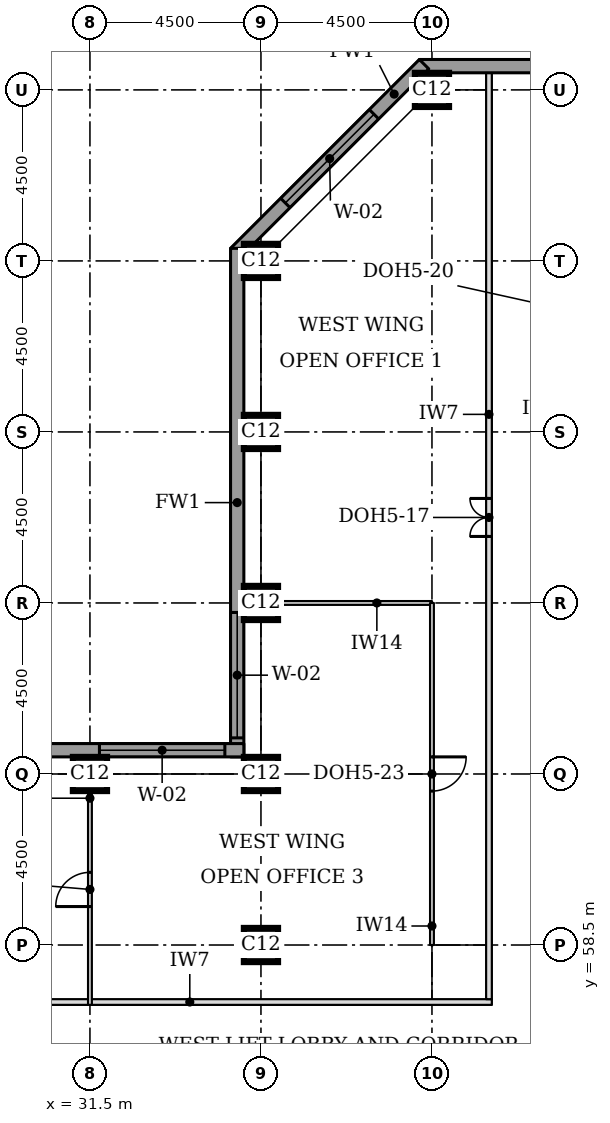
"""IFC4 building model, lengths in metres.
Left out: names, types, materials, properties, quantities, classifications, styles, units other than length and angle.
Written with IfcOpenShell. Run it as: python <this file> out.ifc"""

import sys

from ifc_helpers import new_model, si_unit, direction, frame, frame_2d, origin, origin_2d, place, context, subcontext, project, spatial, rectangle, extrude, element, fill, save


model = new_model("IFC4")
c1 = context("Model", 3, precision=1e-05, world=origin(), true_north=direction((0.0, 1.0)))
c2 = subcontext(c1, "Body", "Model", "MODEL_VIEW")
j1 = project(units=[si_unit("LENGTHUNIT", "METRE"), si_unit("PLANEANGLEUNIT", "RADIAN")], contexts=[c1])
p1 = place(None, origin())
s1 = spatial("IfcSite", under=j1, at=p1, CompositionType="ELEMENT")
p2 = place(p1, origin())
s2 = spatial("IfcBuilding", under=s1, at=p2, CompositionType="ELEMENT")
p3 = place(p2, frame((0.0, 0.0, 177.3)))
s3 = spatial("IfcBuildingStorey", under=s2, at=p3, CompositionType="ELEMENT", Elevation=177.3)
for number, where, z_axis, x_axis in (
    (1, (36.0, 58.5, 0.0), (0.0, 0.0, 1.0), (1.0, 0.0, 0.0)),
    (2, (31.5, 63.0, 0.0), (0.0, 0.0, 1.0), (1.0, 0.0, 0.0)),
    (3, (36.0, 63.0, 0.0), (0.0, 0.0, 1.0), (1.0, 0.0, 0.0)),
    (4, (36.0, 67.5, 0.0), (0.0, 0.0, 1.0), (1.0, 0.0, 0.0)),
    (5, (36.0, 72.0, 0.0), (0.0, 0.0, 1.0), (1.0, 0.0, 0.0)),
    (6, (36.0, 76.5, 0.0), (0.0, 0.0, 1.0), (1.0, 0.0, 0.0)),
    (7, (40.5, 81.0, 0.0), (0.0, 0.0, 1.0), (1.0, 0.0, 0.0)),
):
    element("IfcColumn", number, at=place(p3, frame(where, z_axis=z_axis, x_axis=x_axis)), inside=s3, PredefinedType="COLUMN", context=c2, shape_type="SweptSolid", body=[
        extrude(rectangle(XDim=0.9, YDim=0.9, at=origin_2d()), origin(), (0.0, 0.0, 1.0), 3.7),
    ])
p4 = place(p3, frame((72.331, 81.625, 0.0), z_axis=(0.0, 0.0, 1.0), x_axis=(-1.0, 0.0, 0.0)))
e8 = element("IfcWall", 8, at=p4, inside=s3, PredefinedType="STANDARD", context=c2, shape_type="SweptSolid", body=[
    extrude(rectangle(XDim=32.163, YDim=0.35, at=frame_2d((16.081, 0.0))), origin(), (0.0, 0.0, 1.0), 3.525),
])
p5 = place(p4, frame((5.431, 0.0, 0.9)))
e9 = element("IfcOpeningElement", 9, at=p5, cuts=e8, PredefinedType="OPENING", context=c2, shape_type="SweptSolid", body=[
    extrude(rectangle(XDim=3.3, YDim=1.9, at=frame_2d((1.65, 0.95))), frame((0.0, 0.185, 0.0), z_axis=(0.0, -1.0, 0.0), x_axis=(1.0, 0.0, 0.0)), (0.0, 0.0, 1.0), 0.37),
])
p6 = place(p4, frame((9.931, 0.0, 0.9)))
e10 = element("IfcOpeningElement", 10, at=p6, cuts=e8, PredefinedType="OPENING", context=c2, shape_type="SweptSolid", body=[
    extrude(rectangle(XDim=3.3, YDim=1.9, at=frame_2d((1.65, 0.95))), frame((0.0, 0.185, 0.0), z_axis=(0.0, -1.0, 0.0), x_axis=(1.0, 0.0, 0.0)), (0.0, 0.0, 1.0), 0.37),
])
p7 = place(p4, frame((14.431, 0.0, 0.9)))
e11 = element("IfcOpeningElement", 11, at=p7, cuts=e8, PredefinedType="OPENING", context=c2, shape_type="SweptSolid", body=[
    extrude(rectangle(XDim=3.3, YDim=1.9, at=frame_2d((1.65, 0.95))), frame((0.0, 0.185, 0.0), z_axis=(0.0, -1.0, 0.0), x_axis=(1.0, 0.0, 0.0)), (0.0, 0.0, 1.0), 0.37),
])
p8 = place(p4, frame((18.931, 0.0, 0.9)))
e12 = element("IfcOpeningElement", 12, at=p8, cuts=e8, PredefinedType="OPENING", context=c2, shape_type="SweptSolid", body=[
    extrude(rectangle(XDim=3.3, YDim=1.9, at=frame_2d((1.65, 0.95))), frame((0.0, 0.185, 0.0), z_axis=(0.0, -1.0, 0.0), x_axis=(1.0, 0.0, 0.0)), (0.0, 0.0, 1.0), 0.37),
])
p9 = place(p4, frame((23.431, 0.0, 0.9)))
e13 = element("IfcOpeningElement", 13, at=p9, cuts=e8, PredefinedType="OPENING", context=c2, shape_type="SweptSolid", body=[
    extrude(rectangle(XDim=3.3, YDim=1.9, at=frame_2d((1.65, 0.95))), frame((0.0, 0.185, 0.0), z_axis=(0.0, -1.0, 0.0), x_axis=(1.0, 0.0, 0.0)), (0.0, 0.0, 1.0), 0.37),
])
p10 = place(p3, frame((40.292, 81.676, 0.0), z_axis=(0.0, 0.0, 1.0), x_axis=(-0.707106781187, -0.707106781187, 0.0)))
e14 = element("IfcWall", 14, at=p10, inside=s3, PredefinedType="STANDARD", context=c2, shape_type="SweptSolid", body=[
    extrude(rectangle(XDim=7.027, YDim=0.35, at=frame_2d((3.513, 0.0))), origin(), (0.0, 0.0, 1.0), 3.525),
])
p11 = place(p10, frame((1.863, 0.0, 0.9)))
e15 = element("IfcOpeningElement", 15, at=p11, cuts=e14, PredefinedType="OPENING", context=c2, shape_type="SweptSolid", body=[
    extrude(rectangle(XDim=3.3, YDim=1.9, at=frame_2d((1.65, 0.95))), frame((0.0, 0.185, 0.0), z_axis=(0.0, -1.0, 0.0), x_axis=(1.0, 0.0, 0.0)), (0.0, 0.0, 1.0), 0.37),
])
p12 = place(p3, frame((35.375, 76.831, 0.0), z_axis=(0.0, 0.0, 1.0), x_axis=(0.0, -1.0, 0.0)))
e16 = element("IfcWall", 16, at=p12, inside=s3, PredefinedType="STANDARD", context=c2, shape_type="SweptSolid", body=[
    extrude(rectangle(XDim=13.381, YDim=0.35, at=frame_2d((6.691, 0.0))), origin(), (0.0, 0.0, 1.0), 3.525),
])
p13 = place(p12, frame((9.581, 0.0, 0.9)))
e17 = element("IfcOpeningElement", 17, at=p13, cuts=e16, PredefinedType="OPENING", context=c2, shape_type="SweptSolid", body=[
    extrude(rectangle(XDim=3.3, YDim=1.9, at=frame_2d((1.65, 0.95))), frame((0.0, 0.185, 0.0), z_axis=(0.0, -1.0, 0.0), x_axis=(1.0, 0.0, 0.0)), (0.0, 0.0, 1.0), 0.37),
])
p14 = place(p3, frame((35.55, 63.625, 0.0), z_axis=(0.0, 0.0, 1.0), x_axis=(-1.0, 0.0, 0.0)))
e18 = element("IfcWall", 18, at=p14, inside=s3, PredefinedType="STANDARD", context=c2, shape_type="SweptSolid", body=[
    extrude(rectangle(XDim=17.881, YDim=0.35, at=frame_2d((8.941, 0.0))), origin(), (0.0, 0.0, 1.0), 3.525),
])
p15 = place(p14, frame((0.5, 0.0, 0.9)))
e19 = element("IfcOpeningElement", 19, at=p15, cuts=e18, PredefinedType="OPENING", context=c2, shape_type="SweptSolid", body=[
    extrude(rectangle(XDim=3.3, YDim=1.9, at=frame_2d((1.65, 0.95))), frame((0.0, 0.185, 0.0), z_axis=(0.0, -1.0, 0.0), x_axis=(1.0, 0.0, 0.0)), (0.0, 0.0, 1.0), 0.37),
])
p16 = place(p14, frame((9.15, 0.0, 0.9)))
e20 = element("IfcOpeningElement", 20, at=p16, cuts=e18, PredefinedType="OPENING", context=c2, shape_type="SweptSolid", body=[
    extrude(rectangle(XDim=3.3, YDim=1.9, at=frame_2d((1.65, 0.95))), frame((0.0, 0.185, 0.0), z_axis=(0.0, -1.0, 0.0), x_axis=(1.0, 0.0, 0.0)), (0.0, 0.0, 1.0), 0.37),
])
p17 = place(p3, frame((29.38, 57.0, 0.0), z_axis=(0.0, 0.0, 1.0), x_axis=(1.0, 0.0, 0.0)))
e21 = element("IfcWall", 21, at=p17, inside=s3, PredefinedType="PARTITIONING", context=c2, shape_type="SweptSolid", body=[
    extrude(rectangle(XDim=12.695, YDim=0.15, at=frame_2d((6.348, 0.0))), origin(), (0.0, 0.0, 1.0), 3.55),
])
p18 = place(p3, frame((42.0, 57.075, 0.0), z_axis=(0.0, 0.0, 1.0), x_axis=(0.0, 1.0, 0.0)))
e22 = element("IfcWall", 22, at=p18, inside=s3, PredefinedType="PARTITIONING", context=c2, shape_type="SweptSolid", body=[
    extrude(rectangle(XDim=24.375, YDim=0.15, at=frame_2d((12.188, 0.0))), origin(), (0.0, 0.0, 1.0), 3.55),
])
p19 = place(p18, frame((12.175, 0.0, 0.0)))
e23 = element("IfcOpeningElement", 23, at=p19, cuts=e22, PredefinedType="OPENING", context=c2, shape_type="SweptSolid", body=[
    extrude(rectangle(XDim=1.0, YDim=2.1, at=frame_2d((0.5, 1.05))), frame((0.0, 0.085, 0.0), z_axis=(0.0, -1.0, 0.0), x_axis=(1.0, 0.0, 0.0)), (0.0, 0.0, 1.0), 0.17),
])
p20 = place(p3, frame((36.0, 67.5, 0.0), z_axis=(0.0, 0.0, 1.0), x_axis=(1.0, 0.0, 0.0)))
e24 = element("IfcWall", 24, at=p20, inside=s3, PredefinedType="PARTITIONING", context=c2, shape_type="SweptSolid", body=[
    extrude(rectangle(XDim=4.5, YDim=0.1, at=frame_2d((2.25, 0.0))), origin(), (0.0, 0.0, 1.0), 3.55),
])
p21 = place(p3, frame((40.5, 67.5, 0.0), z_axis=(0.0, 0.0, 1.0), x_axis=(0.0, -1.0, 0.0)))
e25 = element("IfcWall", 25, at=p21, inside=s3, PredefinedType="PARTITIONING", context=c2, shape_type="SweptSolid", body=[
    extrude(rectangle(XDim=9.0, YDim=0.1, at=frame_2d((4.5, 0.0))), origin(), (0.0, 0.0, 1.0), 3.55),
])
p22 = place(p21, frame((4.05, 0.0, 0.0)))
e26 = element("IfcOpeningElement", 26, at=p22, cuts=e25, PredefinedType="OPENING", context=c2, shape_type="SweptSolid", body=[
    extrude(rectangle(XDim=0.9, YDim=2.1, at=frame_2d((0.45, 1.05))), frame((0.0, 0.06, 0.0), z_axis=(0.0, -1.0, 0.0), x_axis=(1.0, 0.0, 0.0)), (0.0, 0.0, 1.0), 0.12),
])
p23 = place(p3, frame((31.5, 63.0, 0.0), z_axis=(0.0, 0.0, 1.0), x_axis=(0.0, -1.0, 0.0)))
e27 = element("IfcWall", 27, at=p23, inside=s3, PredefinedType="PARTITIONING", context=c2, shape_type="SweptSolid", body=[
    extrude(rectangle(XDim=6.075, YDim=0.1, at=frame_2d((3.038, 0.0))), origin(), (0.0, 0.0, 1.0), 3.55),
])
p24 = place(p23, frame((2.588, 0.0, 0.0)))
e28 = element("IfcOpeningElement", 28, at=p24, cuts=e27, PredefinedType="OPENING", context=c2, shape_type="SweptSolid", body=[
    extrude(rectangle(XDim=0.9, YDim=2.1, at=frame_2d((0.45, 1.05))), frame((0.0, 0.06, 0.0), z_axis=(0.0, -1.0, 0.0), x_axis=(1.0, 0.0, 0.0)), (0.0, 0.0, 1.0), 0.12),
])
p25 = place(p11, origin())
e29 = element("IfcWindow", 29, at=p25, inside=s3, PartitioningType="SINGLE_PANEL", PredefinedType="WINDOW", context=c2, shape_type="SweptSolid", body=[
    extrude(rectangle(XDim=3.3, YDim=1.9, at=frame_2d((1.65, 0.95))), frame((0.0, 0.085, 0.0), z_axis=(0.0, -1.0, 0.0), x_axis=(1.0, 0.0, 0.0)), (0.0, 0.0, 1.0), 0.06),
])
fill(e15, e29)
p26 = place(p13, origin())
e30 = element("IfcWindow", 30, at=p26, inside=s3, PartitioningType="SINGLE_PANEL", PredefinedType="WINDOW", context=c2, shape_type="SweptSolid", body=[
    extrude(rectangle(XDim=3.3, YDim=1.9, at=frame_2d((1.65, 0.95))), frame((0.0, 0.085, 0.0), z_axis=(0.0, -1.0, 0.0), x_axis=(1.0, 0.0, 0.0)), (0.0, 0.0, 1.0), 0.06),
])
fill(e17, e30)
p27 = place(p15, origin())
e31 = element("IfcWindow", 31, at=p27, inside=s3, PartitioningType="SINGLE_PANEL", PredefinedType="WINDOW", context=c2, shape_type="SweptSolid", body=[
    extrude(rectangle(XDim=3.3, YDim=1.9, at=frame_2d((1.65, 0.95))), frame((0.0, 0.085, 0.0), z_axis=(0.0, -1.0, 0.0), x_axis=(1.0, 0.0, 0.0)), (0.0, 0.0, 1.0), 0.06),
])
fill(e19, e31)
p28 = place(p19, origin())
e32 = element("IfcDoor", 32, at=p28, inside=s3, OperationType="DOUBLE_DOOR_SINGLE_SWING", PredefinedType="DOOR", context=c2, shape_type="SweptSolid", body=[
    extrude(rectangle(XDim=1.0, YDim=2.1, at=frame_2d((0.5, 1.05))), frame((0.0, 0.025, 0.0), z_axis=(0.0, -1.0, 0.0), x_axis=(1.0, 0.0, 0.0)), (0.0, 0.0, 1.0), 0.05),
])
fill(e23, e32)
p29 = place(p22, origin())
e33 = element("IfcDoor", 33, at=p29, inside=s3, OperationType="SINGLE_SWING_LEFT", PredefinedType="DOOR", context=c2, shape_type="SweptSolid", body=[
    extrude(rectangle(XDim=0.9, YDim=2.1, at=frame_2d((0.45, 1.05))), frame((0.0, 0.025, 0.0), z_axis=(0.0, -1.0, 0.0), x_axis=(1.0, 0.0, 0.0)), (0.0, 0.0, 1.0), 0.05),
])
fill(e26, e33)
p30 = place(p24, frame((0.9, 0.0, 0.0), z_axis=(0.0, 0.0, 1.0), x_axis=(-1.0, 0.0, 0.0)))
e34 = element("IfcDoor", 34, at=p30, inside=s3, OperationType="SINGLE_SWING_LEFT", PredefinedType="DOOR", context=c2, shape_type="SweptSolid", body=[
    extrude(rectangle(XDim=0.9, YDim=2.1, at=frame_2d((0.45, 1.05))), frame((0.0, 0.025, 0.0), z_axis=(0.0, -1.0, 0.0), x_axis=(1.0, 0.0, 0.0)), (0.0, 0.0, 1.0), 0.05),
])
fill(e28, e34)
save(model, sys.argv[1])
